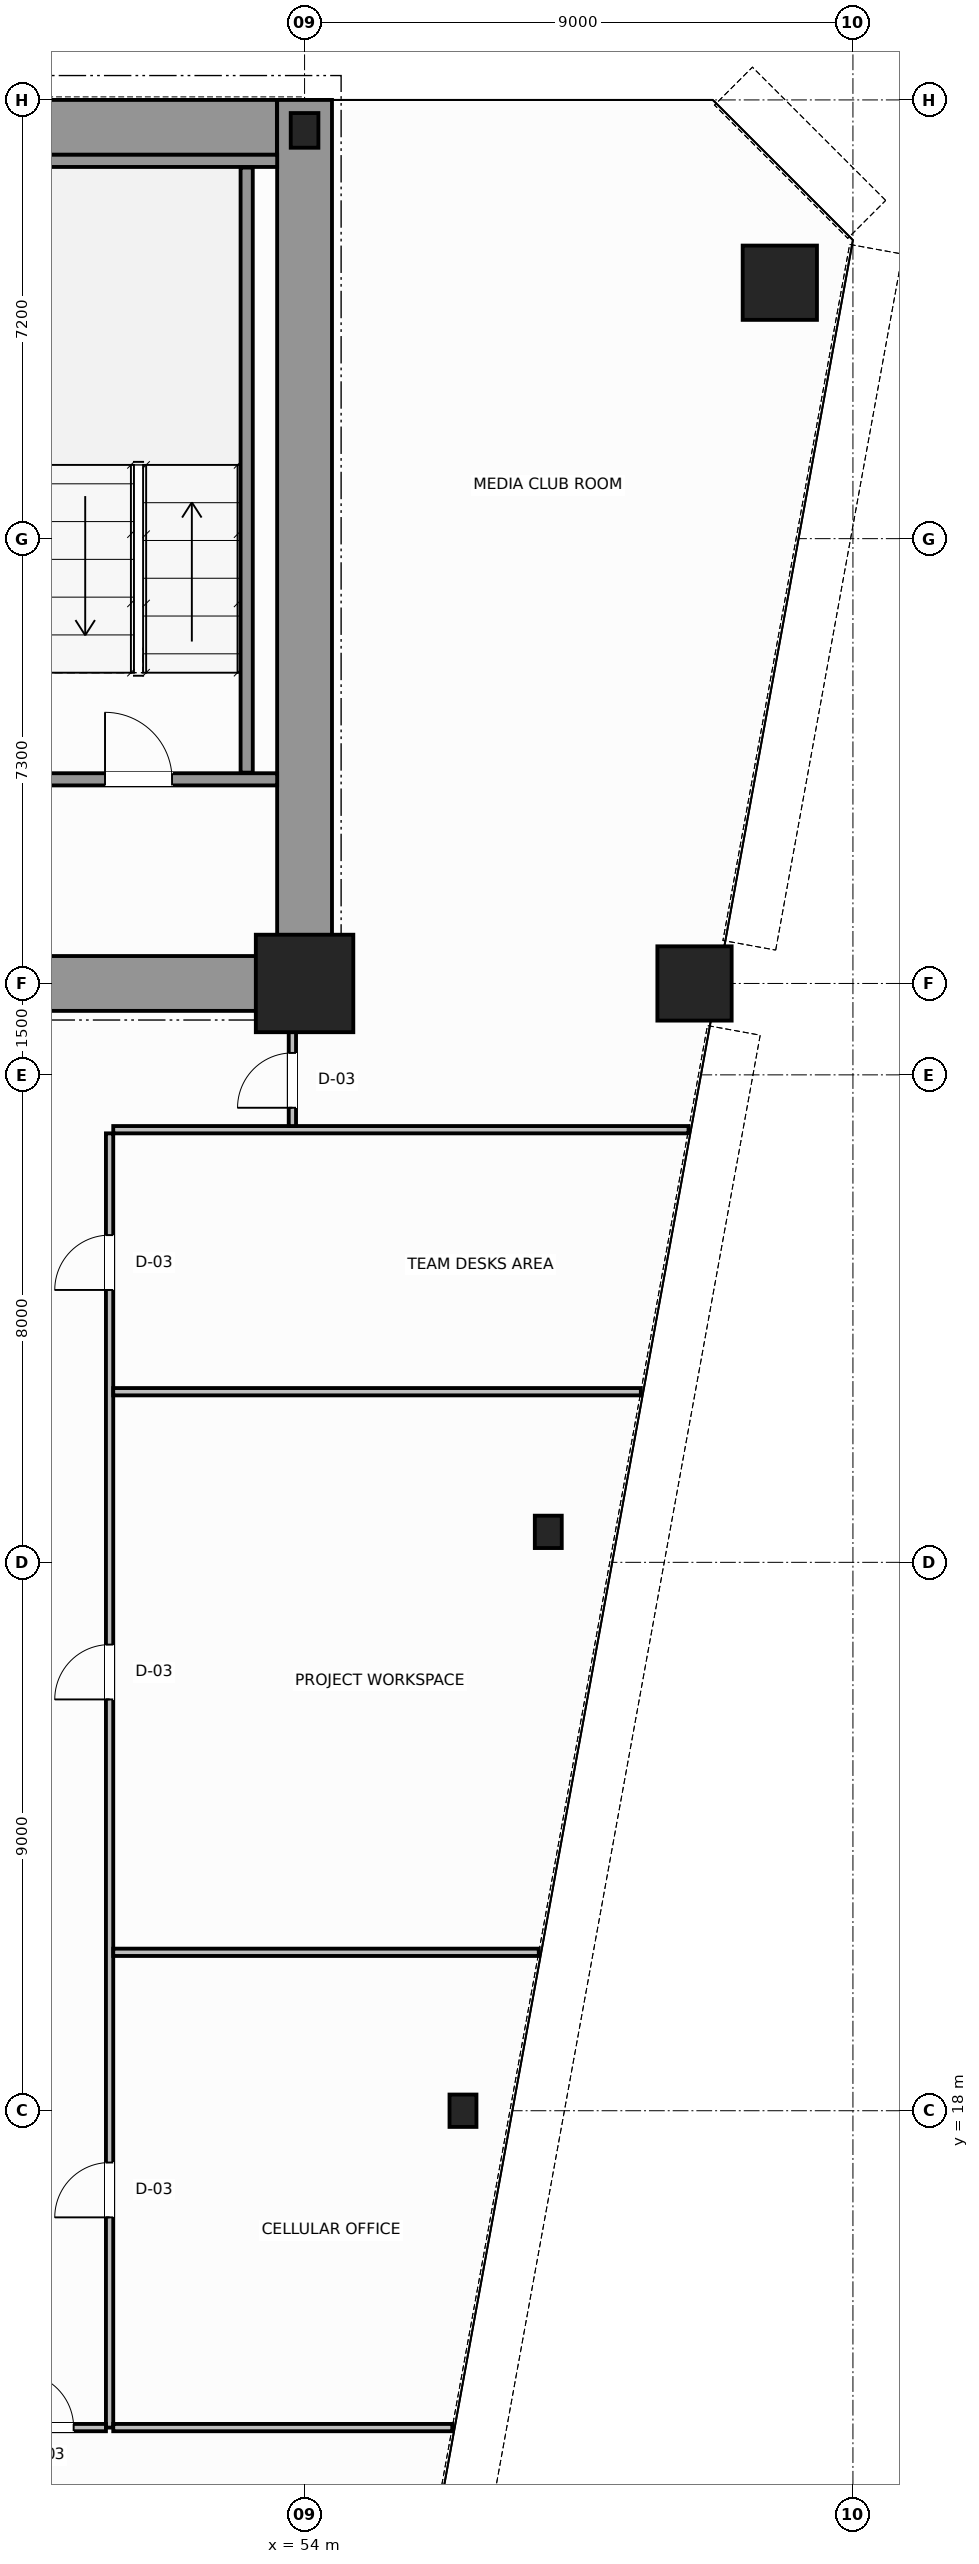
"""IFC4 building model, lengths in metres.
Left out: names, types, materials, properties, quantities, classifications, styles, units other than length and angle.
Written with IfcOpenShell. Run it as: python <this file> out.ifc"""

import sys

from ifc_helpers import new_model, si_unit, direction, frame, frame_2d, origin, origin_2d, place, context, subcontext, project, spatial, rectangle, hollow_circle, i_section, extrude, source, transform, mapped, element, fill, save


model = new_model("IFC4")
c1 = context("Model", 3, precision=1e-05, world=origin(), true_north=direction((0.0, 1.0)))
c2 = subcontext(c1, "Body", "Model", "MODEL_VIEW")
j1 = project(units=[si_unit("LENGTHUNIT", "METRE"), si_unit("PLANEANGLEUNIT", "RADIAN")], contexts=[c1])
p1 = place(None, origin())
s1 = spatial("IfcSite", under=j1, at=p1, CompositionType="ELEMENT")
p2 = place(p1, origin())
s2 = spatial("IfcBuilding", under=s1, at=p2, CompositionType="ELEMENT")
p3 = place(p2, frame((0.0, 0.0, 49.2)))
s3 = spatial("IfcBuildingStorey", under=s2, at=p3, CompositionType="ELEMENT", Elevation=49.2)
m1 = source(origin(), c2, "Body", "SweptSolid", [
    extrude(rectangle(XDim=1.6, YDim=1.6, at=origin_2d()), origin(), (0.0, 0.0, 1.0), 3.8),
])
p4 = place(p3, frame((54.0, 36.5, 0.0), z_axis=(0.0, 0.0, 1.0), x_axis=(1.0, 0.0, 0.0)))
e1 = element("IfcColumn", 1, at=p4, inside=s3, PredefinedType="COLUMN", context=c2, shape_type="MappedRepresentation", body=[
    mapped(m1, transform((0.0, 0.0, 0.0), scale=1.0)),
])
m2 = source(origin(), c2, "Body", "SweptSolid", [
    extrude(i_section(OverallWidth=0.454, OverallDepth=0.569, WebThickness=0.078, FlangeThickness=0.08, FilletRadius=0.015, at=origin_2d()), origin(), (0.0, 0.0, 1.0), 3.8),
])
p5 = place(p3, frame((54.0, 50.5, 0.0), z_axis=(0.0, 0.0, 1.0), x_axis=(1.0, 0.0, 0.0)))
e2 = element("IfcColumn", 2, at=p5, inside=s3, PredefinedType="COLUMN", context=c2, shape_type="MappedRepresentation", body=[
    mapped(m2, transform((0.0, 0.0, 0.0), scale=1.0)),
])
m3 = source(origin(), c2, "Body", "SweptSolid", [
    extrude(hollow_circle(Radius=0.61, WallThickness=0.05, at=origin_2d()), origin(), (0.0, 0.0, 1.0), 3.8),
])
for number, where, z_axis, x_axis in (
    (3, (61.8, 48.0, 0.0), (0.0, 0.0, 1.0), (1.0, 0.0, 0.0)),
    (4, (60.4, 36.5, 0.0), (0.0, 0.0, 1.0), (1.0, 0.0, 0.0)),
):
    element("IfcColumn", number, at=place(p3, frame(where, z_axis=z_axis, x_axis=x_axis)), inside=s3, PredefinedType="COLUMN", context=c2, shape_type="MappedRepresentation", body=[
        mapped(m3, transform((0.0, 0.0, 0.0), scale=1.0)),
    ])
m4 = source(origin(), c2, "Body", "SweptSolid", [
    extrude(i_section(OverallWidth=0.442, OverallDepth=0.531, WebThickness=0.065, FlangeThickness=0.076, FilletRadius=0.015, at=origin_2d()), origin(), (0.0, 0.0, 1.0), 3.8),
])
for number, where, z_axis, x_axis in (
    (5, (58.0, 27.5, 0.0), (0.0, 0.0, 1.0), (1.0, 0.0, 0.0)),
    (6, (56.6, 18.0, 0.0), (0.0, 0.0, 1.0), (1.0, 0.0, 0.0)),
):
    element("IfcColumn", number, at=place(p3, frame(where, z_axis=z_axis, x_axis=x_axis)), inside=s3, PredefinedType="COLUMN", context=c2, shape_type="MappedRepresentation", body=[
        mapped(m4, transform((0.0, 0.0, 0.0), scale=1.0)),
    ])
p6 = place(p3, frame((34.002, 50.55, 0.0), z_axis=(0.0, 0.0, 1.0), x_axis=(1.0, 0.0, 0.0)))
e7 = element("IfcWall", 7, at=p6, inside=s3, PredefinedType="SHEAR", context=c2, shape_type="SweptSolid", body=[
    extrude(rectangle(XDim=19.544, YDim=0.9, at=frame_2d((9.772, 0.0))), origin(), (0.0, 0.0, 1.0), 3.8),
])
p7 = place(p3, frame((54.0, 36.5, 0.0), z_axis=(0.0, 0.0, 1.0), x_axis=(0.0, 1.0, 0.0)))
e8 = element("IfcWall", 8, at=p7, inside=s3, PredefinedType="SHEAR", context=c2, shape_type="SweptSolid", body=[
    extrude(rectangle(XDim=14.5, YDim=0.9, at=frame_2d((7.25, 0.0))), origin(), (0.0, 0.0, 1.0), 3.8),
])
p8 = place(p3, frame((49.8, 36.5, 0.0), z_axis=(0.0, 0.0, 1.0), x_axis=(1.0, 0.0, 0.0)))
e9 = element("IfcWall", 9, at=p8, inside=s3, PredefinedType="SHEAR", context=c2, shape_type="SweptSolid", body=[
    extrude(rectangle(XDim=3.73, YDim=0.9, at=frame_2d((1.865, 0.0))), origin(), (0.0, 0.0, 1.0), 2.38),
])
p9 = place(p3, frame((49.4, 39.85, 0.0), z_axis=(0.0, 0.0, 1.0), x_axis=(1.0, 0.0, 0.0)))
e10 = element("IfcWall", 10, at=p9, inside=s3, PredefinedType="SOLIDWALL", context=c2, shape_type="SweptSolid", body=[
    extrude(rectangle(XDim=4.15, YDim=0.2, at=frame_2d((2.075, 0.0))), origin(), (0.0, 0.0, 1.0), 3.8),
])
p10 = place(p9, frame((1.325, 0.0, 0.0)))
e11 = element("IfcOpeningElement", 11, at=p10, cuts=e10, PredefinedType="OPENING", context=c2, shape_type="SweptSolid", body=[
    extrude(rectangle(XDim=1.1, YDim=2.15, at=frame_2d((0.55, 1.075))), frame((0.0, 0.11, 0.0), z_axis=(0.0, -1.0, 0.0), x_axis=(1.0, 0.0, 0.0)), (0.0, 0.0, 1.0), 0.22),
])
p11 = place(p3, frame((49.4, 50.0, 0.0), z_axis=(0.0, 0.0, 1.0), x_axis=(1.0, 0.0, 0.0)))
e12 = element("IfcWall", 12, at=p11, inside=s3, PredefinedType="SOLIDWALL", context=c2, shape_type="SweptSolid", body=[
    extrude(rectangle(XDim=4.15, YDim=0.2, at=frame_2d((2.075, 0.0))), origin(), (0.0, 0.0, 1.0), 3.8),
])
p12 = place(p3, frame((53.05, 39.96, 0.0), z_axis=(0.0, 0.0, 1.0), x_axis=(0.0, 1.0, 0.0)))
e13 = element("IfcWall", 13, at=p12, inside=s3, PredefinedType="SOLIDWALL", context=c2, shape_type="SweptSolid", body=[
    extrude(rectangle(XDim=9.93, YDim=0.2, at=frame_2d((4.965, 0.0))), origin(), (0.0, 0.0, 1.0), 3.8),
])
p13 = place(p3, frame((50.86, 34.1, 0.0), z_axis=(0.0, 0.0, 1.0), x_axis=(1.0, 0.0, 0.0)))
e14 = element("IfcWall", 14, at=p13, inside=s3, PredefinedType="PARTITIONING", context=c2, shape_type="SweptSolid", body=[
    extrude(rectangle(XDim=9.442, YDim=0.12, at=frame_2d((4.721, 0.0))), origin(), (0.0, 0.0, 1.0), 3.58),
])
p14 = place(p3, frame((53.8, 34.16, 0.0), z_axis=(0.0, 0.0, 1.0), x_axis=(0.0, 1.0, 0.0)))
e15 = element("IfcWall", 15, at=p14, inside=s3, PredefinedType="PARTITIONING", context=c2, shape_type="SweptSolid", body=[
    extrude(rectangle(XDim=2.28, YDim=0.12, at=frame_2d((1.14, 0.0))), origin(), (0.0, 0.0, 1.0), 3.58),
])
p15 = place(p14, frame((0.3, 0.0, 0.0)))
e16 = element("IfcOpeningElement", 16, at=p15, cuts=e15, PredefinedType="OPENING", context=c2, shape_type="SweptSolid", body=[
    extrude(rectangle(XDim=0.9, YDim=2.15, at=frame_2d((0.45, 1.075))), frame((0.0, 0.07, 0.0), z_axis=(0.0, -1.0, 0.0), x_axis=(1.0, 0.0, 0.0)), (0.0, 0.0, 1.0), 0.14),
])
p16 = place(p3, frame((50.8, 12.8, 0.0), z_axis=(0.0, 0.0, 1.0), x_axis=(0.0, 1.0, 0.0)))
e17 = element("IfcWall", 17, at=p16, inside=s3, PredefinedType="PARTITIONING", context=c2, shape_type="SweptSolid", body=[
    extrude(rectangle(XDim=21.24, YDim=0.12, at=frame_2d((10.62, 0.0))), origin(), (0.0, 0.0, 1.0), 3.58),
])
p17 = place(p16, frame((3.45, 0.0, 0.0)))
e18 = element("IfcOpeningElement", 18, at=p17, cuts=e17, PredefinedType="OPENING", context=c2, shape_type="SweptSolid", body=[
    extrude(rectangle(XDim=0.9, YDim=2.15, at=frame_2d((0.45, 1.075))), frame((0.0, 0.07, 0.0), z_axis=(0.0, -1.0, 0.0), x_axis=(1.0, 0.0, 0.0)), (0.0, 0.0, 1.0), 0.14),
])
p18 = place(p16, frame((11.95, 0.0, 0.0)))
e19 = element("IfcOpeningElement", 19, at=p18, cuts=e17, PredefinedType="OPENING", context=c2, shape_type="SweptSolid", body=[
    extrude(rectangle(XDim=0.9, YDim=2.15, at=frame_2d((0.45, 1.075))), frame((0.0, 0.07, 0.0), z_axis=(0.0, -1.0, 0.0), x_axis=(1.0, 0.0, 0.0)), (0.0, 0.0, 1.0), 0.14),
])
p19 = place(p16, frame((18.67, 0.0, 0.0)))
e20 = element("IfcOpeningElement", 20, at=p19, cuts=e17, PredefinedType="OPENING", context=c2, shape_type="SweptSolid", body=[
    extrude(rectangle(XDim=0.9, YDim=2.15, at=frame_2d((0.45, 1.075))), frame((0.0, 0.07, 0.0), z_axis=(0.0, -1.0, 0.0), x_axis=(1.0, 0.0, 0.0)), (0.0, 0.0, 1.0), 0.14),
])
p20 = place(p3, frame((48.86, 12.8, 0.0), z_axis=(0.0, 0.0, 1.0), x_axis=(1.0, 0.0, 0.0)))
e21 = element("IfcWall", 21, at=p20, inside=s3, PredefinedType="PARTITIONING", context=c2, shape_type="SweptSolid", body=[
    extrude(rectangle(XDim=1.88, YDim=0.12, at=frame_2d((0.94, 0.0))), origin(), (0.0, 0.0, 1.0), 3.58),
])
p21 = place(p20, frame((0.45, 0.0, 0.0)))
e22 = element("IfcOpeningElement", 22, at=p21, cuts=e21, PredefinedType="OPENING", context=c2, shape_type="SweptSolid", body=[
    extrude(rectangle(XDim=0.9, YDim=2.15, at=frame_2d((0.45, 1.075))), frame((0.0, 0.07, 0.0), z_axis=(0.0, -1.0, 0.0), x_axis=(1.0, 0.0, 0.0)), (0.0, 0.0, 1.0), 0.14),
])
p22 = place(p3, frame((50.86, 12.8, 0.0), z_axis=(0.0, 0.0, 1.0), x_axis=(1.0, 0.0, 0.0)))
e23 = element("IfcWall", 23, at=p22, inside=s3, PredefinedType="PARTITIONING", context=c2, shape_type="SweptSolid", body=[
    extrude(rectangle(XDim=5.564, YDim=0.12, at=frame_2d((2.782, 0.0))), origin(), (0.0, 0.0, 1.0), 3.58),
])
p23 = place(p3, frame((50.86, 20.6, 0.0), z_axis=(0.0, 0.0, 1.0), x_axis=(1.0, 0.0, 0.0)))
e24 = element("IfcWall", 24, at=p23, inside=s3, PredefinedType="PARTITIONING", context=c2, shape_type="SweptSolid", body=[
    extrude(rectangle(XDim=6.984, YDim=0.12, at=frame_2d((3.492, 0.0))), origin(), (0.0, 0.0, 1.0), 3.58),
])
p24 = place(p3, frame((50.86, 29.8, 0.0), z_axis=(0.0, 0.0, 1.0), x_axis=(1.0, 0.0, 0.0)))
e25 = element("IfcWall", 25, at=p24, inside=s3, PredefinedType="PARTITIONING", context=c2, shape_type="SweptSolid", body=[
    extrude(rectangle(XDim=8.659, YDim=0.12, at=frame_2d((4.33, 0.0))), origin(), (0.0, 0.0, 1.0), 3.58),
])
m5 = source(origin(), c2, "Body", "SweptSolid", [
    extrude(rectangle(XDim=1.1, YDim=2.15, at=frame_2d((0.55, 1.075))), frame((0.0, 0.025, 0.0), z_axis=(0.0, -1.0, 0.0), x_axis=(1.0, 0.0, 0.0)), (0.0, 0.0, 1.0), 0.05),
])
p25 = place(p10, origin())
e26 = element("IfcDoor", 26, at=p25, inside=s3, OperationType="SINGLE_SWING_RIGHT", PredefinedType="DOOR", context=c2, shape_type="MappedRepresentation", body=[
    mapped(m5, transform((0.0, 0.0, 0.0), scale=1.0)),
])
fill(e11, e26)
m6 = source(origin(), c2, "Body", "SweptSolid", [
    extrude(rectangle(XDim=0.9, YDim=2.15, at=frame_2d((0.45, 1.075))), frame((0.0, 0.025, 0.0), z_axis=(0.0, -1.0, 0.0), x_axis=(1.0, 0.0, 0.0)), (0.0, 0.0, 1.0), 0.05),
])
p26 = place(p15, origin())
e27 = element("IfcDoor", 27, at=p26, inside=s3, OperationType="SINGLE_SWING_RIGHT", PredefinedType="DOOR", context=c2, shape_type="MappedRepresentation", body=[
    mapped(m6, transform((0.0, 0.0, 0.0), scale=1.0)),
])
fill(e16, e27)
p27 = place(p17, origin())
e28 = element("IfcDoor", 28, at=p27, inside=s3, OperationType="SINGLE_SWING_RIGHT", PredefinedType="DOOR", context=c2, shape_type="MappedRepresentation", body=[
    mapped(m6, transform((0.0, 0.0, 0.0), scale=1.0)),
])
fill(e18, e28)
p28 = place(p18, origin())
e29 = element("IfcDoor", 29, at=p28, inside=s3, OperationType="SINGLE_SWING_LEFT", PredefinedType="DOOR", context=c2, shape_type="MappedRepresentation", body=[
    mapped(m6, transform((0.0, 0.0, 0.0), scale=1.0)),
])
fill(e19, e29)
p29 = place(p19, origin())
e30 = element("IfcDoor", 30, at=p29, inside=s3, OperationType="SINGLE_SWING_RIGHT", PredefinedType="DOOR", context=c2, shape_type="MappedRepresentation", body=[
    mapped(m6, transform((0.0, 0.0, 0.0), scale=1.0)),
])
fill(e20, e30)
p30 = place(p21, origin())
e31 = element("IfcDoor", 31, at=p30, inside=s3, OperationType="SINGLE_SWING_RIGHT", PredefinedType="DOOR", context=c2, shape_type="MappedRepresentation", body=[
    mapped(m6, transform((0.0, 0.0, 0.0), scale=1.0)),
])
fill(e22, e31)
save(model, sys.argv[1])
